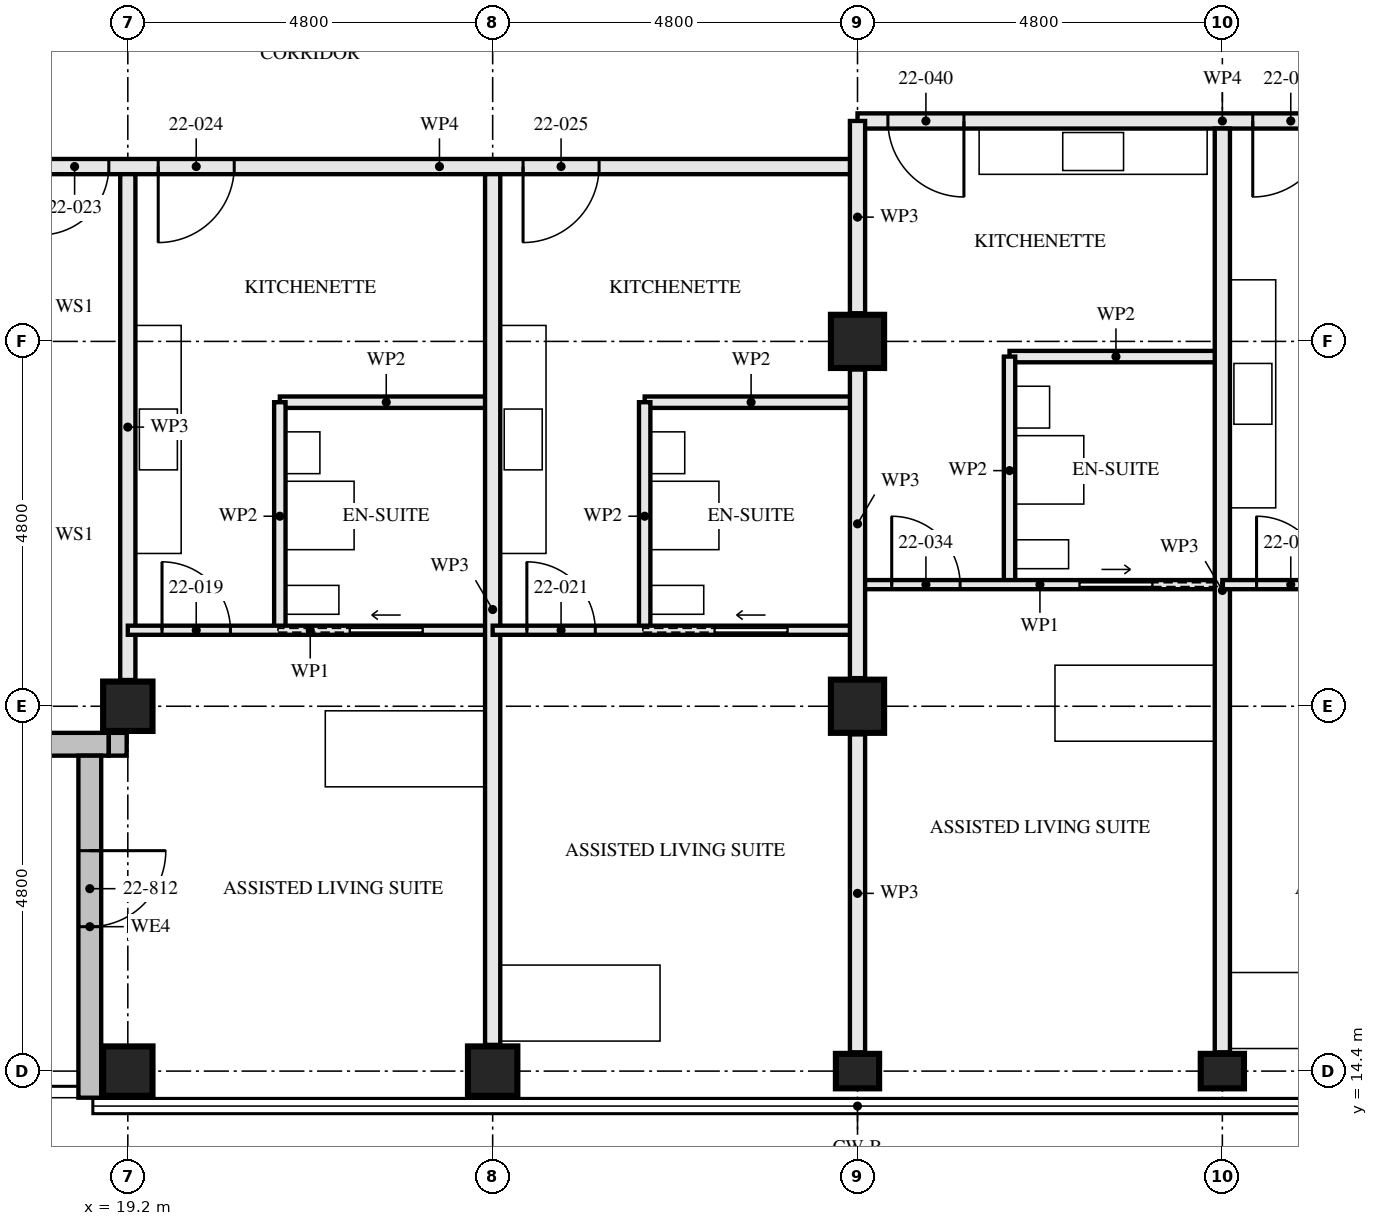
"""IFC4 building model, lengths in metres.
Left out: names, types, materials, properties, quantities, classifications, styles, units other than length and angle.
Written with IfcOpenShell. Run it as: python <this file> out.ifc"""

import sys

from ifc_helpers import new_model, si_unit, direction, frame, frame_2d, origin, origin_2d, place, context, subcontext, project, spatial, rectangle, hollow_rectangle, i_section, extrude, element, fill, save


model = new_model("IFC4")
c1 = context("Model", 3, precision=1e-05, world=origin(), true_north=direction((0.0, 1.0)))
c2 = subcontext(c1, "Body", "Model", "MODEL_VIEW")
j1 = project(units=[si_unit("LENGTHUNIT", "METRE"), si_unit("PLANEANGLEUNIT", "RADIAN")], contexts=[c1])
p1 = place(None, origin())
s1 = spatial("IfcSite", under=j1, at=p1, CompositionType="ELEMENT")
p2 = place(p1, origin())
s2 = spatial("IfcBuilding", under=s1, at=p2, CompositionType="ELEMENT")
p3 = place(p2, frame((0.0, 0.0, 84.0)))
s3 = spatial("IfcBuildingStorey", under=s2, at=p3, CompositionType="ELEMENT", Elevation=84.0)
for number, where, z_axis, x_axis in (
    (1, (19.2, 14.4, 0.0), (0.0, 0.0, 1.0), (0.0, 1.0, 0.0)),
    (2, (19.2, 19.2, 0.0), (0.0, 0.0, 1.0), (0.0, 1.0, 0.0)),
    (3, (24.0, 14.4, 0.0), (0.0, 0.0, 1.0), (0.0, 1.0, 0.0)),
):
    element("IfcColumn", number, at=place(p3, frame(where, z_axis=z_axis, x_axis=x_axis)), inside=s3, PredefinedType="COLUMN", context=c2, shape_type="SweptSolid", body=[
        extrude(hollow_rectangle(XDim=0.65, YDim=0.65, WallThickness=0.08, at=origin_2d()), origin(), (0.0, 0.0, 1.0), 3.5),
    ])
p4 = place(p3, frame((28.8, 14.4, 0.0), z_axis=(0.0, 0.0, 1.0), x_axis=(0.0, 1.0, 0.0)))
e4 = element("IfcColumn", 4, at=p4, inside=s3, PredefinedType="COLUMN", context=c2, shape_type="SweptSolid", body=[
    extrude(i_section(OverallWidth=0.454, OverallDepth=0.569, WebThickness=0.078, FlangeThickness=0.125, FilletRadius=0.015, at=origin_2d()), origin(), (0.0, 0.0, 1.0), 3.5),
])
for number, where, z_axis, x_axis in (
    (5, (28.8, 19.2, 0.0), (0.0, 0.0, 1.0), (1.0, 0.0, 0.0)),
    (6, (28.8, 24.0, 0.0), (0.0, 0.0, 1.0), (1.0, 0.0, 0.0)),
):
    element("IfcColumn", number, at=place(p3, frame(where, z_axis=z_axis, x_axis=x_axis)), inside=s3, PredefinedType="COLUMN", context=c2, shape_type="SweptSolid", body=[
        extrude(hollow_rectangle(XDim=0.7, YDim=0.7, WallThickness=0.06, at=origin_2d()), origin(), (0.0, 0.0, 1.0), 3.5),
    ])
p5 = place(p3, frame((33.6, 14.4, 0.0), z_axis=(0.0, 0.0, 1.0), x_axis=(0.0, 1.0, 0.0)))
e7 = element("IfcColumn", 7, at=p5, inside=s3, PredefinedType="COLUMN", context=c2, shape_type="SweptSolid", body=[
    extrude(i_section(OverallWidth=0.454, OverallDepth=0.569, WebThickness=0.078, FlangeThickness=0.125, FilletRadius=0.015, at=origin_2d()), origin(), (0.0, 0.0, 1.0), 3.5),
])
p6 = place(p3, frame((14.05, 18.7, 0.0), z_axis=(0.0, 0.0, 1.0), x_axis=(1.0, 0.0, 0.0)))
e8 = element("IfcWall", 8, at=p6, inside=s3, PredefinedType="SOLIDWALL", context=c2, shape_type="SweptSolid", body=[
    extrude(rectangle(XDim=4.9, YDim=0.3, at=frame_2d((2.45, 0.0))), origin(), (0.0, 0.0, 1.0), 3.5),
])
p7 = place(p6, frame((2.25, 0.0, 0.0)))
e9 = element("IfcOpeningElement", 9, at=p7, cuts=e8, PredefinedType="OPENING", context=c2, shape_type="SweptSolid", body=[
    extrude(rectangle(XDim=1.0, YDim=2.4, at=frame_2d((0.5, 1.2))), frame((0.0, 0.161, 0.0), z_axis=(0.0, -1.0, 0.0), x_axis=(1.0, 0.0, 0.0)), (0.0, 0.0, 1.0), 0.321),
])
p8 = place(p3, frame((18.7, 18.55, 0.0), z_axis=(0.0, 0.0, 1.0), x_axis=(0.0, -1.0, 0.0)))
e10 = element("IfcWall", 10, at=p8, inside=s3, PredefinedType="SOLIDWALL", context=c2, shape_type="SweptSolid", body=[
    extrude(rectangle(XDim=4.5, YDim=0.3, at=frame_2d((2.25, 0.0))), origin(), (0.0, 0.0, 1.0), 3.5),
])
p9 = place(p8, frame((1.25, 0.0, 0.0)))
e11 = element("IfcOpeningElement", 11, at=p9, cuts=e10, PredefinedType="OPENING", context=c2, shape_type="SweptSolid", body=[
    extrude(rectangle(XDim=1.0, YDim=2.4, at=frame_2d((0.5, 1.2))), frame((0.0, 0.161, 0.0), z_axis=(0.0, -1.0, 0.0), x_axis=(1.0, 0.0, 0.0)), (0.0, 0.0, 1.0), 0.321),
])
p10 = place(p3, frame((18.95, 18.7, 2.39), z_axis=(0.0, 0.0, 1.0), x_axis=(1.0, 0.0, 0.0)))
e12 = element("IfcWall", 12, at=p10, inside=s3, PredefinedType="SOLIDWALL", context=c2, shape_type="SweptSolid", body=[
    extrude(rectangle(XDim=0.235, YDim=0.3, at=frame_2d((0.118, 0.0))), origin(), (0.0, 0.0, 1.0), 0.88),
])
p11 = place(p3, frame((19.2, 19.545, 0.0), z_axis=(0.0, 0.0, 1.0), x_axis=(0.0, 1.0, 0.0)))
e13 = element("IfcWall", 13, at=p11, inside=s3, PredefinedType="PARTITIONING", context=c2, shape_type="SweptSolid", body=[
    extrude(rectangle(XDim=6.655, YDim=0.2, at=frame_2d((3.328, 0.0))), origin(), (0.0, 0.0, 1.0), 2.55),
])
p12 = place(p3, frame((21.2, 20.2, 0.0), z_axis=(0.0, 0.0, 1.0), x_axis=(0.0, 1.0, 0.0)))
e14 = element("IfcWall", 14, at=p12, inside=s3, PredefinedType="PARTITIONING", context=c2, shape_type="SweptSolid", body=[
    extrude(rectangle(XDim=3.0, YDim=0.15, at=frame_2d((1.5, 0.0))), origin(), (0.0, 0.0, 1.0), 3.33),
])
p13 = place(p3, frame((21.2, 23.2, 0.0), z_axis=(0.0, 0.0, 1.0), x_axis=(1.0, 0.0, 0.0)))
e15 = element("IfcWall", 15, at=p13, inside=s3, PredefinedType="PARTITIONING", context=c2, shape_type="SweptSolid", body=[
    extrude(rectangle(XDim=2.8, YDim=0.15, at=frame_2d((1.4, 0.0))), origin(), (0.0, 0.0, 1.0), 3.33),
])
p14 = place(p3, frame((19.2, 20.2, 0.0), z_axis=(0.0, 0.0, 1.0), x_axis=(1.0, 0.0, 0.0)))
e16 = element("IfcWall", 16, at=p14, inside=s3, PredefinedType="PARTITIONING", context=c2, shape_type="SweptSolid", body=[
    extrude(rectangle(XDim=4.8, YDim=0.12, at=frame_2d((2.4, 0.0))), origin(), (0.0, 0.0, 1.0), 3.33),
])
p15 = place(p14, frame((0.45, 0.0, 0.0)))
e17 = element("IfcOpeningElement", 17, at=p15, cuts=e16, PredefinedType="OPENING", context=c2, shape_type="SweptSolid", body=[
    extrude(rectangle(XDim=0.9, YDim=2.1, at=frame_2d((0.45, 1.05))), frame((0.0, 0.071, 0.0), z_axis=(0.0, -1.0, 0.0), x_axis=(1.0, 0.0, 0.0)), (0.0, 0.0, 1.0), 0.141),
])
p16 = place(p14, frame((2.925, 0.0, 0.0)))
e18 = element("IfcOpeningElement", 18, at=p16, cuts=e16, PredefinedType="OPENING", context=c2, shape_type="SweptSolid", body=[
    extrude(rectangle(XDim=0.95, YDim=2.1, at=frame_2d((0.475, 1.05))), frame((0.0, 0.071, 0.0), z_axis=(0.0, -1.0, 0.0), x_axis=(1.0, 0.0, 0.0)), (0.0, 0.0, 1.0), 0.141),
])
p17 = place(p3, frame((24.0, 14.745, 0.0), z_axis=(0.0, 0.0, 1.0), x_axis=(0.0, 1.0, 0.0)))
e19 = element("IfcWall", 19, at=p17, inside=s3, PredefinedType="PARTITIONING", context=c2, shape_type="SweptSolid", body=[
    extrude(rectangle(XDim=11.455, YDim=0.2, at=frame_2d((5.728, 0.0))), origin(), (0.0, 0.0, 1.0), 2.55),
])
p18 = place(p3, frame((26.0, 20.2, 0.0), z_axis=(0.0, 0.0, 1.0), x_axis=(0.0, 1.0, 0.0)))
e20 = element("IfcWall", 20, at=p18, inside=s3, PredefinedType="PARTITIONING", context=c2, shape_type="SweptSolid", body=[
    extrude(rectangle(XDim=3.0, YDim=0.15, at=frame_2d((1.5, 0.0))), origin(), (0.0, 0.0, 1.0), 3.33),
])
p19 = place(p3, frame((26.0, 23.2, 0.0), z_axis=(0.0, 0.0, 1.0), x_axis=(1.0, 0.0, 0.0)))
e21 = element("IfcWall", 21, at=p19, inside=s3, PredefinedType="PARTITIONING", context=c2, shape_type="SweptSolid", body=[
    extrude(rectangle(XDim=2.8, YDim=0.15, at=frame_2d((1.4, 0.0))), origin(), (0.0, 0.0, 1.0), 3.33),
])
p20 = place(p3, frame((24.0, 20.2, 0.0), z_axis=(0.0, 0.0, 1.0), x_axis=(1.0, 0.0, 0.0)))
e22 = element("IfcWall", 22, at=p20, inside=s3, PredefinedType="PARTITIONING", context=c2, shape_type="SweptSolid", body=[
    extrude(rectangle(XDim=4.8, YDim=0.12, at=frame_2d((2.4, 0.0))), origin(), (0.0, 0.0, 1.0), 3.33),
])
p21 = place(p20, frame((0.45, 0.0, 0.0)))
e23 = element("IfcOpeningElement", 23, at=p21, cuts=e22, PredefinedType="OPENING", context=c2, shape_type="SweptSolid", body=[
    extrude(rectangle(XDim=0.9, YDim=2.1, at=frame_2d((0.45, 1.05))), frame((0.0, 0.071, 0.0), z_axis=(0.0, -1.0, 0.0), x_axis=(1.0, 0.0, 0.0)), (0.0, 0.0, 1.0), 0.141),
])
p22 = place(p20, frame((2.925, 0.0, 0.0)))
e24 = element("IfcOpeningElement", 24, at=p22, cuts=e22, PredefinedType="OPENING", context=c2, shape_type="SweptSolid", body=[
    extrude(rectangle(XDim=0.95, YDim=2.1, at=frame_2d((0.475, 1.05))), frame((0.0, 0.071, 0.0), z_axis=(0.0, -1.0, 0.0), x_axis=(1.0, 0.0, 0.0)), (0.0, 0.0, 1.0), 0.141),
])
p23 = place(p3, frame((17.8, 26.3, 0.0), z_axis=(0.0, 0.0, 1.0), x_axis=(1.0, 0.0, 0.0)))
e25 = element("IfcWall", 25, at=p23, inside=s3, PredefinedType="PARTITIONING", context=c2, shape_type="SweptSolid", body=[
    extrude(rectangle(XDim=11.0, YDim=0.2, at=frame_2d((5.5, 0.0))), origin(), (0.0, 0.0, 1.0), 2.55),
])
p24 = place(p23, frame((0.25, 0.0, 0.0)))
e26 = element("IfcOpeningElement", 26, at=p24, cuts=e25, PredefinedType="OPENING", context=c2, shape_type="SweptSolid", body=[
    extrude(rectangle(XDim=0.9, YDim=2.1, at=frame_2d((0.45, 1.05))), frame((0.0, 0.111, 0.0), z_axis=(0.0, -1.0, 0.0), x_axis=(1.0, 0.0, 0.0)), (0.0, 0.0, 1.0), 0.221),
])
p25 = place(p23, frame((1.8, 0.0, 0.0)))
e27 = element("IfcOpeningElement", 27, at=p25, cuts=e25, PredefinedType="OPENING", context=c2, shape_type="SweptSolid", body=[
    extrude(rectangle(XDim=1.0, YDim=2.1, at=frame_2d((0.5, 1.05))), frame((0.0, 0.111, 0.0), z_axis=(0.0, -1.0, 0.0), x_axis=(1.0, 0.0, 0.0)), (0.0, 0.0, 1.0), 0.221),
])
p26 = place(p23, frame((6.6, 0.0, 0.0)))
e28 = element("IfcOpeningElement", 28, at=p26, cuts=e25, PredefinedType="OPENING", context=c2, shape_type="SweptSolid", body=[
    extrude(rectangle(XDim=1.0, YDim=2.1, at=frame_2d((0.5, 1.05))), frame((0.0, 0.111, 0.0), z_axis=(0.0, -1.0, 0.0), x_axis=(1.0, 0.0, 0.0)), (0.0, 0.0, 1.0), 0.221),
])
p27 = place(p3, frame((30.8, 20.8, 0.0), z_axis=(0.0, 0.0, 1.0), x_axis=(0.0, 1.0, 0.0)))
e29 = element("IfcWall", 29, at=p27, inside=s3, PredefinedType="PARTITIONING", context=c2, shape_type="SweptSolid", body=[
    extrude(rectangle(XDim=3.0, YDim=0.15, at=frame_2d((1.5, 0.0))), origin(), (0.0, 0.0, 1.0), 3.33),
])
p28 = place(p3, frame((30.8, 23.8, 0.0), z_axis=(0.0, 0.0, 1.0), x_axis=(1.0, 0.0, 0.0)))
e30 = element("IfcWall", 30, at=p28, inside=s3, PredefinedType="PARTITIONING", context=c2, shape_type="SweptSolid", body=[
    extrude(rectangle(XDim=2.8, YDim=0.15, at=frame_2d((1.4, 0.0))), origin(), (0.0, 0.0, 1.0), 3.33),
])
p29 = place(p3, frame((28.8, 20.8, 0.0), z_axis=(0.0, 0.0, 1.0), x_axis=(1.0, 0.0, 0.0)))
e31 = element("IfcWall", 31, at=p29, inside=s3, PredefinedType="PARTITIONING", context=c2, shape_type="SweptSolid", body=[
    extrude(rectangle(XDim=4.8, YDim=0.12, at=frame_2d((2.4, 0.0))), origin(), (0.0, 0.0, 1.0), 3.33),
])
p30 = place(p29, frame((0.45, 0.0, 0.0)))
e32 = element("IfcOpeningElement", 32, at=p30, cuts=e31, PredefinedType="OPENING", context=c2, shape_type="SweptSolid", body=[
    extrude(rectangle(XDim=0.9, YDim=2.1, at=frame_2d((0.45, 1.05))), frame((0.0, 0.071, 0.0), z_axis=(0.0, -1.0, 0.0), x_axis=(1.0, 0.0, 0.0)), (0.0, 0.0, 1.0), 0.141),
])
p31 = place(p29, frame((2.925, 0.0, 0.0)))
e33 = element("IfcOpeningElement", 33, at=p31, cuts=e31, PredefinedType="OPENING", context=c2, shape_type="SweptSolid", body=[
    extrude(rectangle(XDim=0.95, YDim=2.1, at=frame_2d((0.475, 1.05))), frame((0.0, 0.071, 0.0), z_axis=(0.0, -1.0, 0.0), x_axis=(1.0, 0.0, 0.0)), (0.0, 0.0, 1.0), 0.141),
])
p32 = place(p3, frame((33.6, 14.647, 0.0), z_axis=(0.0, 0.0, 1.0), x_axis=(0.0, 1.0, 0.0)))
e34 = element("IfcWall", 34, at=p32, inside=s3, PredefinedType="PARTITIONING", context=c2, shape_type="SweptSolid", body=[
    extrude(rectangle(XDim=12.153, YDim=0.2, at=frame_2d((6.077, 0.0))), origin(), (0.0, 0.0, 1.0), 2.55),
])
p33 = place(p3, frame((33.6, 20.8, 0.0), z_axis=(0.0, 0.0, 1.0), x_axis=(1.0, 0.0, 0.0)))
e35 = element("IfcWall", 35, at=p33, inside=s3, PredefinedType="PARTITIONING", context=c2, shape_type="SweptSolid", body=[
    extrude(rectangle(XDim=4.8, YDim=0.12, at=frame_2d((2.4, 0.0))), origin(), (0.0, 0.0, 1.0), 3.33),
])
p34 = place(p33, frame((0.45, 0.0, 0.0)))
e36 = element("IfcOpeningElement", 36, at=p34, cuts=e35, PredefinedType="OPENING", context=c2, shape_type="SweptSolid", body=[
    extrude(rectangle(XDim=0.9, YDim=2.1, at=frame_2d((0.45, 1.05))), frame((0.0, 0.071, 0.0), z_axis=(0.0, -1.0, 0.0), x_axis=(1.0, 0.0, 0.0)), (0.0, 0.0, 1.0), 0.141),
])
p35 = place(p33, frame((2.925, 0.0, 0.0)))
e37 = element("IfcOpeningElement", 37, at=p35, cuts=e35, PredefinedType="OPENING", context=c2, shape_type="SweptSolid", body=[
    extrude(rectangle(XDim=0.95, YDim=2.1, at=frame_2d((0.475, 1.05))), frame((0.0, 0.071, 0.0), z_axis=(0.0, -1.0, 0.0), x_axis=(1.0, 0.0, 0.0)), (0.0, 0.0, 1.0), 0.141),
])
p36 = place(p3, frame((28.8, 26.9, 0.0), z_axis=(0.0, 0.0, 1.0), x_axis=(1.0, 0.0, 0.0)))
e38 = element("IfcWall", 38, at=p36, inside=s3, PredefinedType="PARTITIONING", context=c2, shape_type="SweptSolid", body=[
    extrude(rectangle(XDim=9.6, YDim=0.2, at=frame_2d((4.8, 0.0))), origin(), (0.0, 0.0, 1.0), 3.33),
])
p37 = place(p36, frame((0.4, 0.0, 0.0)))
e39 = element("IfcOpeningElement", 39, at=p37, cuts=e38, PredefinedType="OPENING", context=c2, shape_type="SweptSolid", body=[
    extrude(rectangle(XDim=1.0, YDim=2.1, at=frame_2d((0.5, 1.05))), frame((0.0, 0.111, 0.0), z_axis=(0.0, -1.0, 0.0), x_axis=(1.0, 0.0, 0.0)), (0.0, 0.0, 1.0), 0.221),
])
p38 = place(p36, frame((5.2, 0.0, 0.0)))
e40 = element("IfcOpeningElement", 40, at=p38, cuts=e38, PredefinedType="OPENING", context=c2, shape_type="SweptSolid", body=[
    extrude(rectangle(XDim=1.0, YDim=2.1, at=frame_2d((0.5, 1.05))), frame((0.0, 0.111, 0.0), z_axis=(0.0, -1.0, 0.0), x_axis=(1.0, 0.0, 0.0)), (0.0, 0.0, 1.0), 0.221),
])
p39 = place(p3, frame((28.8, 14.647, 0.0), z_axis=(0.0, 0.0, 1.0), x_axis=(0.0, 1.0, 0.0)))
e41 = element("IfcWall", 41, at=p39, inside=s3, PredefinedType="PARTITIONING", context=c2, shape_type="SweptSolid", body=[
    extrude(rectangle(XDim=4.183, YDim=0.2, at=frame_2d((2.092, 0.0))), origin(), (0.0, 0.0, 1.0), 2.32),
])
p40 = place(p3, frame((28.8, 19.57, 0.0), z_axis=(0.0, 0.0, 1.0), x_axis=(0.0, 1.0, 0.0)))
e42 = element("IfcWall", 42, at=p40, inside=s3, PredefinedType="PARTITIONING", context=c2, shape_type="SweptSolid", body=[
    extrude(rectangle(XDim=4.06, YDim=0.2, at=frame_2d((2.03, 0.0))), origin(), (0.0, 0.0, 1.0), 2.32),
])
p41 = place(p3, frame((28.8, 24.37, 0.0), z_axis=(0.0, 0.0, 1.0), x_axis=(0.0, 1.0, 0.0)))
e43 = element("IfcWall", 43, at=p41, inside=s3, PredefinedType="PARTITIONING", context=c2, shape_type="SweptSolid", body=[
    extrude(rectangle(XDim=2.53, YDim=0.2, at=frame_2d((1.265, 0.0))), origin(), (0.0, 0.0, 1.0), 2.32),
])
p42 = place(p9, origin())
e44 = element("IfcDoor", 44, at=p42, inside=s3, OperationType="SINGLE_SWING_LEFT", PredefinedType="DOOR", context=c2, shape_type="SweptSolid", body=[
    extrude(rectangle(XDim=1.0, YDim=2.4, at=frame_2d((0.5, 1.2))), frame((0.0, 0.035, 0.0), z_axis=(0.0, -1.0, 0.0), x_axis=(1.0, 0.0, 0.0)), (0.0, 0.0, 1.0), 0.07),
])
fill(e11, e44)
p43 = place(p15, origin())
e45 = element("IfcDoor", 45, at=p43, inside=s3, OperationType="SINGLE_SWING_RIGHT", PredefinedType="DOOR", context=c2, shape_type="SweptSolid", body=[
    extrude(rectangle(XDim=0.9, YDim=2.1, at=frame_2d((0.45, 1.05))), frame((0.0, 0.022, 0.0), z_axis=(0.0, -1.0, 0.0), x_axis=(1.0, 0.0, 0.0)), (0.0, 0.0, 1.0), 0.044),
])
fill(e17, e45)
p44 = place(p16, origin())
e46 = element("IfcDoor", 46, at=p44, inside=s3, OperationType="SLIDING_TO_RIGHT", PredefinedType="DOOR", context=c2, shape_type="SweptSolid", body=[
    extrude(rectangle(XDim=0.95, YDim=2.1, at=frame_2d((0.475, 1.05))), frame((0.0, 0.022, 0.0), z_axis=(0.0, -1.0, 0.0), x_axis=(1.0, 0.0, 0.0)), (0.0, 0.0, 1.0), 0.044),
])
fill(e18, e46)
p45 = place(p21, origin())
e47 = element("IfcDoor", 47, at=p45, inside=s3, OperationType="SINGLE_SWING_RIGHT", PredefinedType="DOOR", context=c2, shape_type="SweptSolid", body=[
    extrude(rectangle(XDim=0.9, YDim=2.1, at=frame_2d((0.45, 1.05))), frame((0.0, 0.022, 0.0), z_axis=(0.0, -1.0, 0.0), x_axis=(1.0, 0.0, 0.0)), (0.0, 0.0, 1.0), 0.044),
])
fill(e23, e47)
p46 = place(p22, origin())
e48 = element("IfcDoor", 48, at=p46, inside=s3, OperationType="SLIDING_TO_RIGHT", PredefinedType="DOOR", context=c2, shape_type="SweptSolid", body=[
    extrude(rectangle(XDim=0.95, YDim=2.1, at=frame_2d((0.475, 1.05))), frame((0.0, 0.022, 0.0), z_axis=(0.0, -1.0, 0.0), x_axis=(1.0, 0.0, 0.0)), (0.0, 0.0, 1.0), 0.044),
])
fill(e24, e48)
p47 = place(p24, frame((0.9, 0.0, 0.0), z_axis=(0.0, 0.0, 1.0), x_axis=(-1.0, 0.0, 0.0)))
e49 = element("IfcDoor", 49, at=p47, inside=s3, OperationType="SINGLE_SWING_LEFT", PredefinedType="DOOR", context=c2, shape_type="SweptSolid", body=[
    extrude(rectangle(XDim=0.9, YDim=2.1, at=frame_2d((0.45, 1.05))), frame((0.0, 0.027, 0.0), z_axis=(0.0, -1.0, 0.0), x_axis=(1.0, 0.0, 0.0)), (0.0, 0.0, 1.0), 0.054),
])
fill(e26, e49)
p48 = place(p25, frame((1.0, 0.0, 0.0), z_axis=(0.0, 0.0, 1.0), x_axis=(-1.0, 0.0, 0.0)))
e50 = element("IfcDoor", 50, at=p48, inside=s3, OperationType="SINGLE_SWING_LEFT", PredefinedType="DOOR", context=c2, shape_type="SweptSolid", body=[
    extrude(rectangle(XDim=1.0, YDim=2.1, at=frame_2d((0.5, 1.05))), frame((0.0, 0.027, 0.0), z_axis=(0.0, -1.0, 0.0), x_axis=(1.0, 0.0, 0.0)), (0.0, 0.0, 1.0), 0.054),
])
fill(e27, e50)
p49 = place(p26, frame((1.0, 0.0, 0.0), z_axis=(0.0, 0.0, 1.0), x_axis=(-1.0, 0.0, 0.0)))
e51 = element("IfcDoor", 51, at=p49, inside=s3, OperationType="SINGLE_SWING_LEFT", PredefinedType="DOOR", context=c2, shape_type="SweptSolid", body=[
    extrude(rectangle(XDim=1.0, YDim=2.1, at=frame_2d((0.5, 1.05))), frame((0.0, 0.027, 0.0), z_axis=(0.0, -1.0, 0.0), x_axis=(1.0, 0.0, 0.0)), (0.0, 0.0, 1.0), 0.054),
])
fill(e28, e51)
p50 = place(p30, origin())
e52 = element("IfcDoor", 52, at=p50, inside=s3, OperationType="SINGLE_SWING_RIGHT", PredefinedType="DOOR", context=c2, shape_type="SweptSolid", body=[
    extrude(rectangle(XDim=0.9, YDim=2.1, at=frame_2d((0.45, 1.05))), frame((0.0, 0.022, 0.0), z_axis=(0.0, -1.0, 0.0), x_axis=(1.0, 0.0, 0.0)), (0.0, 0.0, 1.0), 0.044),
])
fill(e32, e52)
p51 = place(p31, origin())
e53 = element("IfcDoor", 53, at=p51, inside=s3, OperationType="SLIDING_TO_LEFT", PredefinedType="DOOR", context=c2, shape_type="SweptSolid", body=[
    extrude(rectangle(XDim=0.95, YDim=2.1, at=frame_2d((0.475, 1.05))), frame((0.0, 0.022, 0.0), z_axis=(0.0, -1.0, 0.0), x_axis=(1.0, 0.0, 0.0)), (0.0, 0.0, 1.0), 0.044),
])
fill(e33, e53)
p52 = place(p34, origin())
e54 = element("IfcDoor", 54, at=p52, inside=s3, OperationType="SINGLE_SWING_RIGHT", PredefinedType="DOOR", context=c2, shape_type="SweptSolid", body=[
    extrude(rectangle(XDim=0.9, YDim=2.1, at=frame_2d((0.45, 1.05))), frame((0.0, 0.022, 0.0), z_axis=(0.0, -1.0, 0.0), x_axis=(1.0, 0.0, 0.0)), (0.0, 0.0, 1.0), 0.044),
])
fill(e36, e54)
p53 = place(p37, frame((1.0, 0.0, 0.0), z_axis=(0.0, 0.0, 1.0), x_axis=(-1.0, 0.0, 0.0)))
e55 = element("IfcDoor", 55, at=p53, inside=s3, OperationType="SINGLE_SWING_RIGHT", PredefinedType="DOOR", context=c2, shape_type="SweptSolid", body=[
    extrude(rectangle(XDim=1.0, YDim=2.1, at=frame_2d((0.5, 1.05))), frame((0.0, 0.027, 0.0), z_axis=(0.0, -1.0, 0.0), x_axis=(1.0, 0.0, 0.0)), (0.0, 0.0, 1.0), 0.054),
])
fill(e39, e55)
p54 = place(p38, frame((1.0, 0.0, 0.0), z_axis=(0.0, 0.0, 1.0), x_axis=(-1.0, 0.0, 0.0)))
e56 = element("IfcDoor", 56, at=p54, inside=s3, OperationType="SINGLE_SWING_LEFT", PredefinedType="DOOR", context=c2, shape_type="SweptSolid", body=[
    extrude(rectangle(XDim=1.0, YDim=2.1, at=frame_2d((0.5, 1.05))), frame((0.0, 0.027, 0.0), z_axis=(0.0, -1.0, 0.0), x_axis=(1.0, 0.0, 0.0)), (0.0, 0.0, 1.0), 0.054),
])
fill(e40, e56)
save(model, sys.argv[1])
